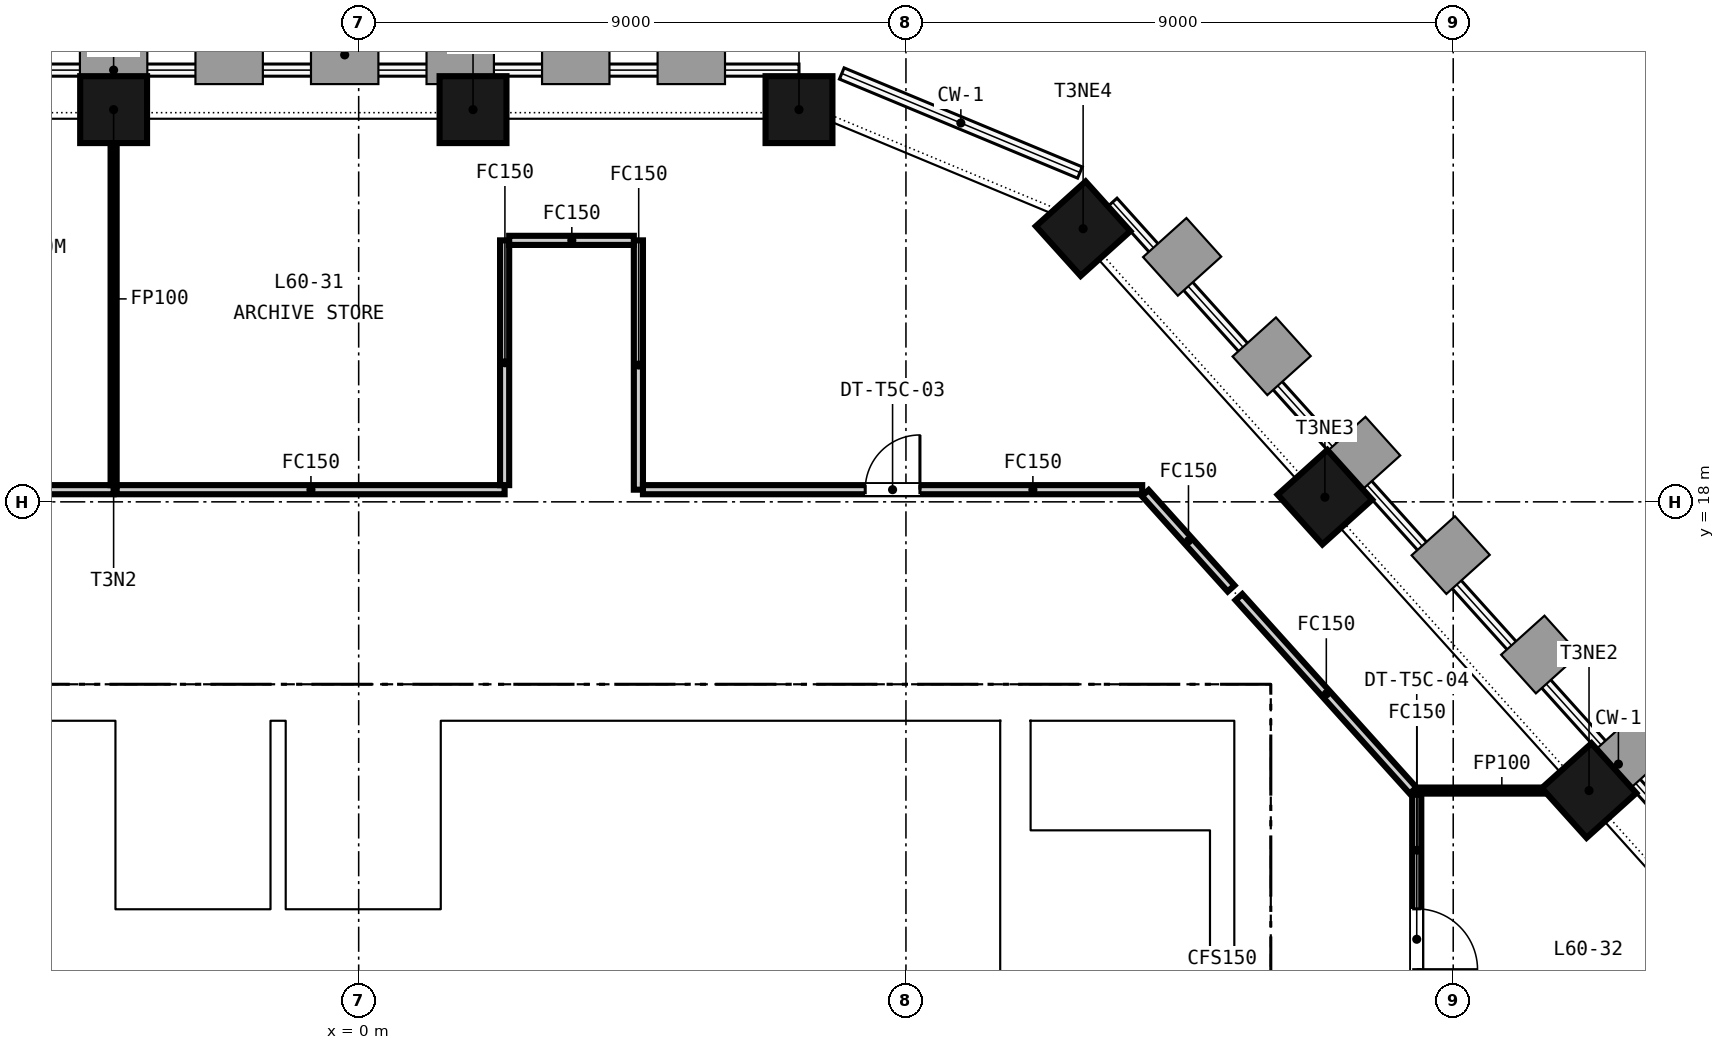
"""IFC4 building model, lengths in metres.
Left out: names, types, materials, properties, quantities, classifications, styles, units other than length and angle.
Written with IfcOpenShell. Run it as: python <this file> out.ifc"""

import sys

from ifc_helpers import new_model, si_unit, direction, frame, frame_2d, origin, origin_2d, place, context, subcontext, project, spatial, rectangle, extrude, element, fill, save


model = new_model("IFC4")
c1 = context("Model", 3, precision=1e-05, world=origin(), true_north=direction((0.0, 1.0)))
c2 = subcontext(c1, "Body", "Model", "MODEL_VIEW")
j1 = project(units=[si_unit("LENGTHUNIT", "METRE"), si_unit("PLANEANGLEUNIT", "RADIAN")], contexts=[c1])
p1 = place(None, origin())
s1 = spatial("IfcSite", under=j1, at=p1, CompositionType="ELEMENT")
p2 = place(p1, origin())
s2 = spatial("IfcBuilding", under=s1, at=p2, CompositionType="ELEMENT")
p3 = place(p2, frame((0.0, 0.0, 238.2)))
s3 = spatial("IfcBuildingStorey", under=s2, at=p3, CompositionType="ELEMENT", Elevation=238.2)
p4 = place(p3, frame((-15.0, 14.7, -0.15), z_axis=(0.0, 0.0, 1.0), x_axis=(1.0, 0.0, 0.0)))
e1 = element("IfcWall", 1, at=p4, inside=s3, PredefinedType="SOLIDWALL", context=c2, shape_type="SweptSolid", body=[
    extrude(rectangle(XDim=30.0, YDim=0.6, at=frame_2d((15.0, 0.0))), origin(), (0.0, 0.0, 1.0), 3.65),
])
p5 = place(p4, frame((9.25, 0.0, 0.15)))
e2 = element("IfcOpeningElement", 2, at=p5, cuts=e1, PredefinedType="OPENING", context=c2, shape_type="SweptSolid", body=[
    extrude(rectangle(XDim=1.5, YDim=2.1, at=frame_2d((0.75, 1.05))), frame((0.0, 0.31, 0.0), z_axis=(0.0, -1.0, 0.0), x_axis=(1.0, 0.0, 0.0)), (0.0, 0.0, 1.0), 0.62),
])
p6 = place(p4, frame((19.4, 0.0, 0.15)))
e3 = element("IfcOpeningElement", 3, at=p6, cuts=e1, PredefinedType="OPENING", context=c2, shape_type="SweptSolid", body=[
    extrude(rectangle(XDim=1.5, YDim=2.1, at=frame_2d((0.75, 1.05))), frame((0.0, 0.31, 0.0), z_axis=(0.0, -1.0, 0.0), x_axis=(1.0, 0.0, 0.0)), (0.0, 0.0, 1.0), 0.62),
])
p7 = place(p4, frame((1.5, 0.0, 0.15)))
e4 = element("IfcOpeningElement", 4, at=p7, cuts=e1, PredefinedType="OPENING", context=c2, shape_type="SweptSolid", body=[
    extrude(rectangle(XDim=1.2, YDim=2.1, at=frame_2d((0.6, 1.05))), frame((0.0, 0.31, 0.0), z_axis=(0.0, -1.0, 0.0), x_axis=(1.0, 0.0, 0.0)), (0.0, 0.0, 1.0), 0.62),
])
p8 = place(p4, frame((27.3, 0.0, 0.15)))
e5 = element("IfcOpeningElement", 5, at=p8, cuts=e1, PredefinedType="OPENING", context=c2, shape_type="SweptSolid", body=[
    extrude(rectangle(XDim=1.2, YDim=2.1, at=frame_2d((0.6, 1.05))), frame((0.0, 0.31, 0.0), z_axis=(0.0, -1.0, 0.0), x_axis=(1.0, 0.0, 0.0)), (0.0, 0.0, 1.0), 0.62),
])
p9 = place(p3, frame((14.7, 0.6, -0.15), z_axis=(0.0, 0.0, 1.0), x_axis=(0.0, 1.0, 0.0)))
e6 = element("IfcWall", 6, at=p9, inside=s3, PredefinedType="SOLIDWALL", context=c2, shape_type="SweptSolid", body=[
    extrude(rectangle(XDim=13.8, YDim=0.6, at=frame_2d((6.9, 0.0))), origin(), (0.0, 0.0, 1.0), 3.65),
])
p10 = place(p3, frame((10.8, 0.6, -0.15), z_axis=(0.0, 0.0, 1.0), x_axis=(0.0, 1.0, 0.0)))
e7 = element("IfcWall", 7, at=p10, inside=s3, PredefinedType="SOLIDWALL", context=c2, shape_type="SweptSolid", body=[
    extrude(rectangle(XDim=13.8, YDim=0.5, at=frame_2d((6.9, 0.0))), origin(), (0.0, 0.0, 1.0), 3.65),
])
for number, where, z_axis, x_axis in (
    (8, (7.241, 24.45, -0.15), (0.0, 0.0, 1.0), (-1.0, 0.0, 0.0)),
    (9, (1.881, 24.45, -0.15), (0.0, 0.0, 1.0), (-1.0, 0.0, 0.0)),
    (10, (-4.03, 24.45, -0.15), (0.0, 0.0, 1.0), (-1.0, 0.0, 0.0)),
    (11, (20.233, 13.252, -0.15), (0.0, 0.0, 1.0), (-0.669, 0.743, 0.0)),
    (12, (15.89, 18.076, -0.15), (0.0, 0.0, 1.0), (-0.669, 0.743, 0.0)),
    (13, (11.914, 22.492, -0.15), (0.0, 0.0, 1.0), (-0.669, 0.743, 0.0)),
):
    element("IfcColumn", number, at=place(p3, frame(where, z_axis=z_axis, x_axis=x_axis)), inside=s3, PredefinedType="COLUMN", context=c2, shape_type="SweptSolid", body=[
        extrude(rectangle(XDim=1.1, YDim=1.1, at=origin_2d()), origin(), (0.0, 0.0, 1.0), 3.65),
    ])
p11 = place(p3, frame((-4.25, 11.2, 0.0), z_axis=(0.0, 0.0, 1.0), x_axis=(1.0, 0.0, 0.0)))
e14 = element("IfcWall", 14, at=p11, inside=s3, PredefinedType="PARTITIONING", context=c2, shape_type="SweptSolid", body=[
    extrude(rectangle(XDim=8.65, YDim=0.2, at=frame_2d((4.325, 0.0))), origin(), (0.0, 0.0, 1.0), 3.5),
])
p12 = place(p11, frame((0.825, 0.0, 0.0)))
e15 = element("IfcOpeningElement", 15, at=p12, cuts=e14, PredefinedType="OPENING", context=c2, shape_type="SweptSolid", body=[
    extrude(rectangle(XDim=1.4, YDim=2.1, at=frame_2d((0.7, 1.05))), frame((0.0, 0.11, 0.0), z_axis=(0.0, -1.0, 0.0), x_axis=(1.0, 0.0, 0.0)), (0.0, 0.0, 1.0), 0.22),
])
p13 = place(p11, frame((3.625, 0.0, 0.0)))
e16 = element("IfcOpeningElement", 16, at=p13, cuts=e14, PredefinedType="OPENING", context=c2, shape_type="SweptSolid", body=[
    extrude(rectangle(XDim=1.4, YDim=2.1, at=frame_2d((0.7, 1.05))), frame((0.0, 0.11, 0.0), z_axis=(0.0, -1.0, 0.0), x_axis=(1.0, 0.0, 0.0)), (0.0, 0.0, 1.0), 0.22),
])
p14 = place(p11, frame((6.675, 0.0, 0.0)))
e17 = element("IfcOpeningElement", 17, at=p14, cuts=e14, PredefinedType="OPENING", context=c2, shape_type="SweptSolid", body=[
    extrude(rectangle(XDim=0.9, YDim=2.1, at=frame_2d((0.45, 1.05))), frame((0.0, 0.11, 0.0), z_axis=(0.0, -1.0, 0.0), x_axis=(1.0, 0.0, 0.0)), (0.0, 0.0, 1.0), 0.22),
])
p15 = place(p3, frame((5.9, 11.2, 0.0), z_axis=(0.0, 0.0, 1.0), x_axis=(1.0, 0.0, 0.0)))
e18 = element("IfcWall", 18, at=p15, inside=s3, PredefinedType="PARTITIONING", context=c2, shape_type="SweptSolid", body=[
    extrude(rectangle(XDim=4.65, YDim=0.2, at=frame_2d((2.325, 0.0))), origin(), (0.0, 0.0, 1.0), 3.5),
])
p16 = place(p15, frame((1.025, 0.0, 0.0)))
e19 = element("IfcOpeningElement", 19, at=p16, cuts=e18, PredefinedType="OPENING", context=c2, shape_type="SweptSolid", body=[
    extrude(rectangle(XDim=1.0, YDim=2.1, at=frame_2d((0.5, 1.05))), frame((0.0, 0.11, 0.0), z_axis=(0.0, -1.0, 0.0), x_axis=(1.0, 0.0, 0.0)), (0.0, 0.0, 1.0), 0.22),
])
p17 = place(p15, frame((3.4, 0.0, 0.0)))
e20 = element("IfcOpeningElement", 20, at=p17, cuts=e18, PredefinedType="OPENING", context=c2, shape_type="SweptSolid", body=[
    extrude(rectangle(XDim=0.9, YDim=2.1, at=frame_2d((0.45, 1.05))), frame((0.0, 0.11, 0.0), z_axis=(0.0, -1.0, 0.0), x_axis=(1.0, 0.0, 0.0)), (0.0, 0.0, 1.0), 0.22),
])
p18 = place(p3, frame((-4.125, 6.15, 0.0), z_axis=(0.0, 0.0, 1.0), x_axis=(0.0, 1.0, 0.0)))
e21 = element("IfcWall", 21, at=p18, inside=s3, PredefinedType="PARTITIONING", context=c2, shape_type="SweptSolid", body=[
    extrude(rectangle(XDim=4.95, YDim=0.25, at=frame_2d((2.475, 0.0))), origin(), (0.0, 0.0, 1.0), 3.5),
])
p19 = place(p18, frame((3.125, 0.0, 0.0)))
e22 = element("IfcOpeningElement", 22, at=p19, cuts=e21, PredefinedType="OPENING", context=c2, shape_type="SweptSolid", body=[
    extrude(rectangle(XDim=1.2, YDim=2.1, at=frame_2d((0.6, 1.05))), frame((0.0, 0.135, 0.0), z_axis=(0.0, -1.0, 0.0), x_axis=(1.0, 0.0, 0.0)), (0.0, 0.0, 1.0), 0.27),
])
for number, where, z_axis, x_axis in (
    (23, (-4.125, 11.3, 0.0), (0.0, 0.0, 1.0), (0.0, 1.0, 0.0)),
    (24, (-1.325, 11.3, 0.0), (0.0, 0.0, 1.0), (0.0, 1.0, 0.0)),
    (25, (1.475, 11.3, 0.0), (0.0, 0.0, 1.0), (0.0, 1.0, 0.0)),
    (26, (4.275, 11.3, 0.0), (0.0, 0.0, 1.0), (0.0, 1.0, 0.0)),
    (27, (6.025, 11.3, 0.0), (0.0, 0.0, 1.0), (0.0, 1.0, 0.0)),
    (28, (8.825, 11.3, 0.0), (0.0, 0.0, 1.0), (0.0, 1.0, 0.0)),
):
    element("IfcWall", number, at=place(p3, frame(where, z_axis=z_axis, x_axis=x_axis)), inside=s3, PredefinedType="PARTITIONING", context=c2, shape_type="SweptSolid", body=[
        extrude(rectangle(XDim=3.1, YDim=0.25, at=frame_2d((1.55, 0.0))), origin(), (0.0, 0.0, 1.0), 3.5),
    ])
p20 = place(p3, frame((14.2, 0.6, 0.0), z_axis=(0.0, 0.0, 1.0), x_axis=(0.0, 1.0, 0.0)))
e29 = element("IfcWall", 29, at=p20, inside=s3, PredefinedType="SOLIDWALL", context=c2, shape_type="SweptSolid", body=[
    extrude(rectangle(XDim=13.8, YDim=0.4, at=frame_2d((6.9, 0.0))), origin(), (0.0, 0.0, 1.0), 3.5),
])
p21 = place(p3, frame((4.6, 22.3, 0.0), z_axis=(0.0, 0.0, 1.0), x_axis=(0.0, -1.0, 0.0)))
e30 = element("IfcWall", 30, at=p21, inside=s3, PredefinedType="PARTITIONING", context=c2, shape_type="SweptSolid", body=[
    extrude(rectangle(XDim=4.1, YDim=0.15, at=frame_2d((2.05, 0.0))), origin(), (0.0, 0.0, 1.0), 2.751),
])
p22 = place(p3, frame((17.4, 13.186, 0.0), z_axis=(0.0, 0.0, 1.0), x_axis=(0.0, -1.0, 0.0)))
e31 = element("IfcWall", 31, at=p22, inside=s3, PredefinedType="PARTITIONING", context=c2, shape_type="SweptSolid", body=[
    extrude(rectangle(XDim=4.758, YDim=0.15, at=frame_2d((2.379, 0.0))), origin(), (0.0, 0.0, 1.0), 2.751),
])
p23 = place(p22, frame((1.879, 0.0, 0.0)))
e32 = element("IfcOpeningElement", 32, at=p23, cuts=e31, PredefinedType="OPENING", context=c2, shape_type="SweptSolid", body=[
    extrude(rectangle(XDim=1.0, YDim=2.1, at=frame_2d((0.5, 1.05))), frame((0.0, 0.085, 0.0), z_axis=(0.0, -1.0, 0.0), x_axis=(1.0, 0.0, 0.0)), (0.0, 0.0, 1.0), 0.17),
])
p24 = place(p3, frame((-7.825, 18.2, 0.0), z_axis=(0.0, 0.0, 1.0), x_axis=(1.0, 0.0, 0.0)))
e33 = element("IfcWall", 33, at=p24, inside=s3, PredefinedType="PARTITIONING", context=c2, shape_type="SweptSolid", body=[
    extrude(rectangle(XDim=3.795, YDim=0.15, at=frame_2d((1.897, 0.0))), origin(), (0.0, 0.0, 1.0), 2.751),
])
p25 = place(p3, frame((-4.03, 18.275, 0.0), z_axis=(0.0, 0.0, 1.0), x_axis=(0.0, 1.0, 0.0)))
e34 = element("IfcWall", 34, at=p25, inside=s3, PredefinedType="PARTITIONING", context=c2, shape_type="SweptSolid", body=[
    extrude(rectangle(XDim=6.125, YDim=0.1, at=frame_2d((3.062, 0.0))), origin(), (0.0, 0.0, 1.0), 2.751),
])
p26 = place(p3, frame((-3.98, 18.2, 0.0), z_axis=(0.0, 0.0, 1.0), x_axis=(1.0, 0.0, 0.0)))
e35 = element("IfcWall", 35, at=p26, inside=s3, PredefinedType="PARTITIONING", context=c2, shape_type="SweptSolid", body=[
    extrude(rectangle(XDim=6.38, YDim=0.15, at=frame_2d((3.19, 0.0))), origin(), (0.0, 0.0, 1.0), 2.751),
])
p27 = place(p3, frame((2.4, 18.275, 0.0), z_axis=(0.0, 0.0, 1.0), x_axis=(0.0, 1.0, 0.0)))
e36 = element("IfcWall", 36, at=p27, inside=s3, PredefinedType="PARTITIONING", context=c2, shape_type="SweptSolid", body=[
    extrude(rectangle(XDim=4.025, YDim=0.15, at=frame_2d((2.013, 0.0))), origin(), (0.0, 0.0, 1.0), 2.751),
])
p28 = place(p3, frame((2.475, 22.3, 0.0), z_axis=(0.0, 0.0, 1.0), x_axis=(1.0, 0.0, 0.0)))
e37 = element("IfcWall", 37, at=p28, inside=s3, PredefinedType="PARTITIONING", context=c2, shape_type="SweptSolid", body=[
    extrude(rectangle(XDim=2.05, YDim=0.15, at=frame_2d((1.025, 0.0))), origin(), (0.0, 0.0, 1.0), 2.751),
])
p29 = place(p3, frame((4.675, 18.2, 0.0), z_axis=(0.0, 0.0, 1.0), x_axis=(1.0, 0.0, 0.0)))
e38 = element("IfcWall", 38, at=p29, inside=s3, PredefinedType="PARTITIONING", context=c2, shape_type="SweptSolid", body=[
    extrude(rectangle(XDim=8.21, YDim=0.15, at=frame_2d((4.105, 0.0))), origin(), (0.0, 0.0, 1.0), 2.751),
])
p30 = place(p29, frame((3.655, 0.0, 0.0)))
e39 = element("IfcOpeningElement", 39, at=p30, cuts=e38, PredefinedType="OPENING", context=c2, shape_type="SweptSolid", body=[
    extrude(rectangle(XDim=0.9, YDim=2.1, at=frame_2d((0.45, 1.05))), frame((0.0, 0.085, 0.0), z_axis=(0.0, -1.0, 0.0), x_axis=(1.0, 0.0, 0.0)), (0.0, 0.0, 1.0), 0.17),
])
p31 = place(p3, frame((12.935, 18.144, 0.0), z_axis=(0.0, 0.0, 1.0), x_axis=(0.669054213286, -0.743213603, 0.0)))
e40 = element("IfcWall", 40, at=p31, inside=s3, PredefinedType="PARTITIONING", context=c2, shape_type="SweptSolid", body=[
    extrude(rectangle(XDim=2.11, YDim=0.15, at=frame_2d((1.055, 0.0))), origin(), (0.0, 0.0, 1.0), 2.751),
])
p32 = place(p3, frame((14.476, 16.433, 0.0), z_axis=(0.0, 0.0, 1.0), x_axis=(0.669119130918, -0.74315515785, 0.0)))
e41 = element("IfcWall", 41, at=p32, inside=s3, PredefinedType="PARTITIONING", context=c2, shape_type="SweptSolid", body=[
    extrude(rectangle(XDim=4.28, YDim=0.15, at=frame_2d((2.14, 0.0))), origin(), (0.0, 0.0, 1.0), 2.751),
])
p33 = place(p3, frame((17.423, 13.252, 0.0), z_axis=(0.0, 0.0, 1.0), x_axis=(1.0, 0.0, 0.0)))
e42 = element("IfcWall", 42, at=p33, inside=s3, PredefinedType="PARTITIONING", context=c2, shape_type="SweptSolid", body=[
    extrude(rectangle(XDim=2.743, YDim=0.1, at=frame_2d((1.372, 0.0))), origin(), (0.0, 0.0, 1.0), 2.751),
])
p34 = place(p19, origin())
e43 = element("IfcDoor", 43, at=p34, inside=s3, OperationType="SINGLE_SWING_LEFT", PredefinedType="DOOR", context=c2, shape_type="SweptSolid", body=[
    extrude(rectangle(XDim=1.2, YDim=2.1, at=frame_2d((0.6, 1.05))), frame((0.0, 0.025, 0.0), z_axis=(0.0, -1.0, 0.0), x_axis=(1.0, 0.0, 0.0)), (0.0, 0.0, 1.0), 0.05),
])
fill(e22, e43)
p35 = place(p12, origin())
e44 = element("IfcDoor", 44, at=p35, inside=s3, OperationType="DOUBLE_DOOR_SLIDING", PredefinedType="DOOR", context=c2, shape_type="SweptSolid", body=[
    extrude(rectangle(XDim=1.4, YDim=2.1, at=frame_2d((0.7, 1.05))), frame((0.0, 0.025, 0.0), z_axis=(0.0, -1.0, 0.0), x_axis=(1.0, 0.0, 0.0)), (0.0, 0.0, 1.0), 0.05),
])
fill(e15, e44)
p36 = place(p13, origin())
e45 = element("IfcDoor", 45, at=p36, inside=s3, OperationType="DOUBLE_DOOR_SLIDING", PredefinedType="DOOR", context=c2, shape_type="SweptSolid", body=[
    extrude(rectangle(XDim=1.4, YDim=2.1, at=frame_2d((0.7, 1.05))), frame((0.0, 0.025, 0.0), z_axis=(0.0, -1.0, 0.0), x_axis=(1.0, 0.0, 0.0)), (0.0, 0.0, 1.0), 0.05),
])
fill(e16, e45)
p37 = place(p14, origin())
e46 = element("IfcDoor", 46, at=p37, inside=s3, OperationType="SINGLE_SWING_LEFT", PredefinedType="DOOR", context=c2, shape_type="SweptSolid", body=[
    extrude(rectangle(XDim=0.9, YDim=2.1, at=frame_2d((0.45, 1.05))), frame((0.0, 0.025, 0.0), z_axis=(0.0, -1.0, 0.0), x_axis=(1.0, 0.0, 0.0)), (0.0, 0.0, 1.0), 0.05),
])
fill(e17, e46)
p38 = place(p16, origin())
e47 = element("IfcDoor", 47, at=p38, inside=s3, OperationType="SINGLE_SWING_RIGHT", PredefinedType="DOOR", context=c2, shape_type="SweptSolid", body=[
    extrude(rectangle(XDim=1.0, YDim=2.1, at=frame_2d((0.5, 1.05))), frame((0.0, 0.025, 0.0), z_axis=(0.0, -1.0, 0.0), x_axis=(1.0, 0.0, 0.0)), (0.0, 0.0, 1.0), 0.05),
])
fill(e19, e47)
p39 = place(p17, origin())
e48 = element("IfcDoor", 48, at=p39, inside=s3, OperationType="SINGLE_SWING_LEFT", PredefinedType="DOOR", context=c2, shape_type="SweptSolid", body=[
    extrude(rectangle(XDim=0.9, YDim=2.1, at=frame_2d((0.45, 1.05))), frame((0.0, 0.025, 0.0), z_axis=(0.0, -1.0, 0.0), x_axis=(1.0, 0.0, 0.0)), (0.0, 0.0, 1.0), 0.05),
])
fill(e20, e48)
p40 = place(p5, origin())
e49 = element("IfcDoor", 49, at=p40, inside=s3, OperationType="DOUBLE_DOOR_SINGLE_SWING", PredefinedType="DOOR", context=c2, shape_type="SweptSolid", body=[
    extrude(rectangle(XDim=1.5, YDim=2.1, at=frame_2d((0.75, 1.05))), frame((0.0, 0.025, 0.0), z_axis=(0.0, -1.0, 0.0), x_axis=(1.0, 0.0, 0.0)), (0.0, 0.0, 1.0), 0.05),
])
fill(e2, e49)
p41 = place(p6, origin())
e50 = element("IfcDoor", 50, at=p41, inside=s3, OperationType="DOUBLE_DOOR_SINGLE_SWING", PredefinedType="DOOR", context=c2, shape_type="SweptSolid", body=[
    extrude(rectangle(XDim=1.5, YDim=2.1, at=frame_2d((0.75, 1.05))), frame((0.0, 0.025, 0.0), z_axis=(0.0, -1.0, 0.0), x_axis=(1.0, 0.0, 0.0)), (0.0, 0.0, 1.0), 0.05),
])
fill(e3, e50)
p42 = place(p8, origin())
e51 = element("IfcDoor", 51, at=p42, inside=s3, OperationType="SINGLE_SWING_LEFT", PredefinedType="DOOR", context=c2, shape_type="SweptSolid", body=[
    extrude(rectangle(XDim=1.2, YDim=2.1, at=frame_2d((0.6, 1.05))), frame((0.0, 0.025, 0.0), z_axis=(0.0, -1.0, 0.0), x_axis=(1.0, 0.0, 0.0)), (0.0, 0.0, 1.0), 0.05),
])
fill(e5, e51)
p43 = place(p30, origin())
e52 = element("IfcDoor", 52, at=p43, inside=s3, OperationType="SINGLE_SWING_RIGHT", PredefinedType="DOOR", context=c2, shape_type="SweptSolid", body=[
    extrude(rectangle(XDim=0.9, YDim=2.1, at=frame_2d((0.45, 1.05))), frame((0.0, 0.025, 0.0), z_axis=(0.0, -1.0, 0.0), x_axis=(1.0, 0.0, 0.0)), (0.0, 0.0, 1.0), 0.05),
])
fill(e39, e52)
p44 = place(p23, origin())
e53 = element("IfcDoor", 53, at=p44, inside=s3, OperationType="SINGLE_SWING_RIGHT", PredefinedType="DOOR", context=c2, shape_type="SweptSolid", body=[
    extrude(rectangle(XDim=1.0, YDim=2.1, at=frame_2d((0.5, 1.05))), frame((0.0, 0.025, 0.0), z_axis=(0.0, -1.0, 0.0), x_axis=(1.0, 0.0, 0.0)), (0.0, 0.0, 1.0), 0.05),
])
fill(e32, e53)
save(model, sys.argv[1])
